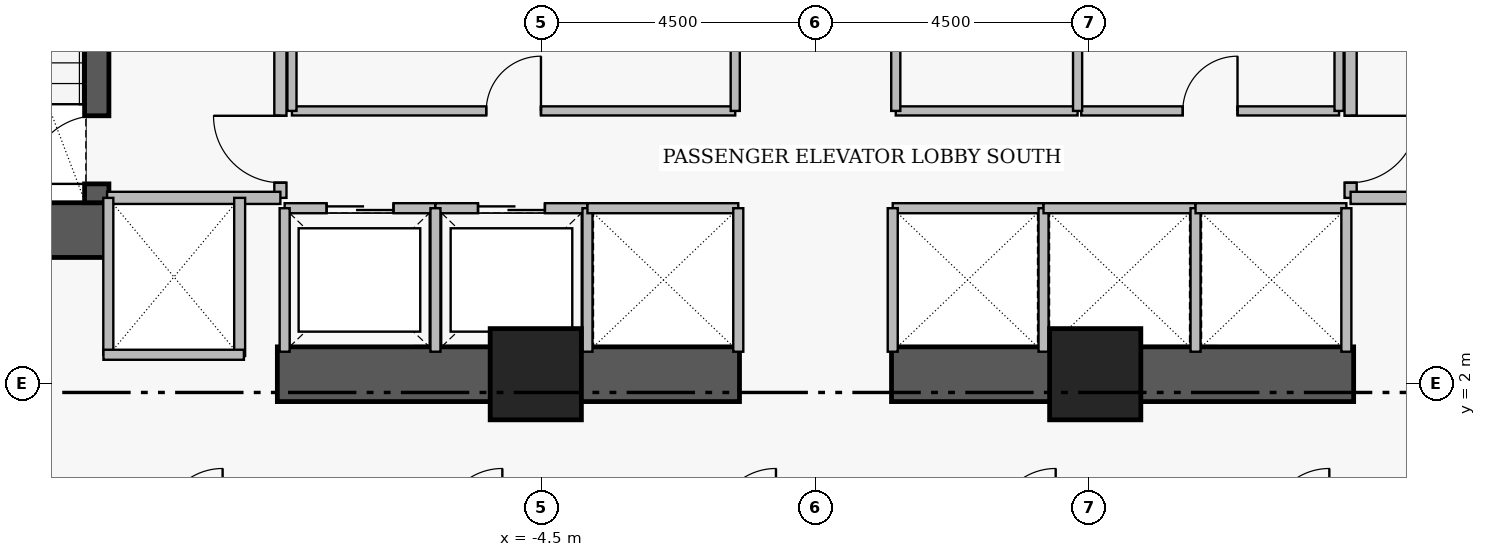
"""IFC4 building model, lengths in metres.
Left out: names, types, materials, properties, quantities, classifications, styles, units other than length and angle.
Written with IfcOpenShell. Run it as: python <this file> out.ifc"""

import sys

from ifc_helpers import new_model, si_unit, direction, frame, frame_2d, origin, origin_2d, place, context, subcontext, project, spatial, rectangle, extrude, element, fill, save


model = new_model("IFC4")
c1 = context("Model", 3, precision=1e-05, world=origin(), true_north=direction((0.0, 1.0)))
c2 = subcontext(c1, "Body", "Model", "MODEL_VIEW")
j1 = project(units=[si_unit("LENGTHUNIT", "METRE"), si_unit("PLANEANGLEUNIT", "RADIAN")], contexts=[c1])
p1 = place(None, origin())
s1 = spatial("IfcSite", under=j1, at=p1, CompositionType="ELEMENT")
p2 = place(p1, origin())
s2 = spatial("IfcBuilding", under=s1, at=p2, CompositionType="ELEMENT")
p3 = place(p2, frame((0.0, 0.0, 60.45)))
s3 = spatial("IfcBuildingStorey", under=s2, at=p3, CompositionType="ELEMENT", Elevation=60.45)
p4 = place(p3, frame((-16.31, 4.52, 0.0), z_axis=(0.0, 0.0, 1.0), x_axis=(1.0, 0.0, 0.0)))
e1 = element("IfcWall", 1, at=p4, inside=s3, PredefinedType="SHEAR", context=c2, shape_type="SweptSolid", body=[
    extrude(rectangle(XDim=4.71, YDim=0.9, at=frame_2d((2.355, 0.0))), origin(), (0.0, 0.0, 1.0), 3.46),
])
for number, where, z_axis, x_axis in (
    (2, (-8.85, 2.15, 0.0), (0.0, 0.0, 1.0), (1.0, 0.0, 0.0)),
    (3, (1.25, 2.15, 0.0), (0.0, 0.0, 1.0), (1.0, 0.0, 0.0)),
):
    element("IfcWall", number, at=place(p3, frame(where, z_axis=z_axis, x_axis=x_axis)), inside=s3, PredefinedType="SHEAR", context=c2, shape_type="SweptSolid", body=[
        extrude(rectangle(XDim=7.6, YDim=0.9, at=frame_2d((3.8, 0.0))), origin(), (0.0, 0.0, 1.0), 3.43),
    ])
p5 = place(p3, frame((-11.82, 4.97, 0.0), z_axis=(0.0, 0.0, 1.0), x_axis=(0.0, 1.0, 0.0)))
e4 = element("IfcWall", 4, at=p5, inside=s3, PredefinedType="SHEAR", context=c2, shape_type="SweptSolid", body=[
    extrude(rectangle(XDim=8.96, YDim=0.4, at=frame_2d((4.48, 0.0))), origin(), (0.0, 0.0, 1.0), 3.46),
])
p6 = place(p5, frame((0.31, 0.0, 0.0)))
e5 = element("IfcOpeningElement", 5, at=p6, cuts=e4, PredefinedType="OPENING", context=c2, shape_type="SweptSolid", body=[
    extrude(rectangle(XDim=1.12, YDim=2.22, at=frame_2d((0.56, 1.11))), frame((0.0, 0.21, 0.0), z_axis=(0.0, -1.0, 0.0), x_axis=(1.0, 0.0, 0.0)), (0.0, 0.0, 1.0), 0.42),
])
for number, where, z_axis, x_axis in (
    (6, (-4.6, 2.15, 0.0), (0.0, 0.0, 1.0), (1.0, 0.0, 0.0)),
    (7, (4.6, 2.15, 0.0), (0.0, 0.0, 1.0), (1.0, 0.0, 0.0)),
):
    element("IfcColumn", number, at=place(p3, frame(where, z_axis=z_axis, x_axis=x_axis)), inside=s3, PredefinedType="COLUMN", context=c2, shape_type="SweptSolid", body=[
        extrude(rectangle(XDim=1.5, YDim=1.5, at=origin_2d()), origin(), (0.0, 0.0, 1.0), 3.65),
    ])
p7 = place(p3, frame((-8.8, 5.05, 0.0), z_axis=(0.0, 0.0, 1.0), x_axis=(0.0, 1.0, 0.0)))
e8 = element("IfcWall", 8, at=p7, inside=s3, PredefinedType="PARTITIONING", context=c2, shape_type="SweptSolid", body=[
    extrude(rectangle(XDim=6.1, YDim=0.2, at=frame_2d((3.05, 0.0))), origin(), (0.0, 0.0, 1.0), 3.43),
])
p8 = place(p7, frame((0.25, 0.0, 0.0)))
e9 = element("IfcOpeningElement", 9, at=p8, cuts=e8, PredefinedType="OPENING", context=c2, shape_type="SweptSolid", body=[
    extrude(rectangle(XDim=1.1, YDim=2.2, at=frame_2d((0.55, 1.1))), frame((0.0, 0.11, 0.0), z_axis=(0.0, -1.0, 0.0), x_axis=(1.0, 0.0, 0.0)), (0.0, 0.0, 1.0), 0.22),
])
p9 = place(p7, frame((3.85, 0.0, 0.0)))
e10 = element("IfcOpeningElement", 10, at=p9, cuts=e8, PredefinedType="OPENING", context=c2, shape_type="SweptSolid", body=[
    extrude(rectangle(XDim=1.1, YDim=2.2, at=frame_2d((0.55, 1.1))), frame((0.0, 0.11, 0.0), z_axis=(0.0, -1.0, 0.0), x_axis=(1.0, 0.0, 0.0)), (0.0, 0.0, 1.0), 0.22),
])
p10 = place(p3, frame((8.8, 11.15, 0.0), z_axis=(0.0, 0.0, 1.0), x_axis=(0.0, -1.0, 0.0)))
e11 = element("IfcWall", 11, at=p10, inside=s3, PredefinedType="PARTITIONING", context=c2, shape_type="SweptSolid", body=[
    extrude(rectangle(XDim=6.1, YDim=0.2, at=frame_2d((3.05, 0.0))), origin(), (0.0, 0.0, 1.0), 3.43),
])
p11 = place(p10, frame((1.15, 0.0, 0.0)))
e12 = element("IfcOpeningElement", 12, at=p11, cuts=e11, PredefinedType="OPENING", context=c2, shape_type="SweptSolid", body=[
    extrude(rectangle(XDim=1.1, YDim=2.2, at=frame_2d((0.55, 1.1))), frame((0.0, 0.11, 0.0), z_axis=(0.0, -1.0, 0.0), x_axis=(1.0, 0.0, 0.0)), (0.0, 0.0, 1.0), 0.22),
])
p12 = place(p10, frame((4.75, 0.0, 0.0)))
e13 = element("IfcOpeningElement", 13, at=p12, cuts=e11, PredefinedType="OPENING", context=c2, shape_type="SweptSolid", body=[
    extrude(rectangle(XDim=1.1, YDim=2.2, at=frame_2d((0.55, 1.1))), frame((0.0, 0.11, 0.0), z_axis=(0.0, -1.0, 0.0), x_axis=(1.0, 0.0, 0.0)), (0.0, 0.0, 1.0), 0.22),
])
p13 = place(p3, frame((-8.73, 4.88, 0.0), z_axis=(0.0, 0.0, 1.0), x_axis=(1.0, 0.0, 0.0)))
e14 = element("IfcWall", 14, at=p13, inside=s3, PredefinedType="PARTITIONING", context=c2, shape_type="SweptSolid", body=[
    extrude(rectangle(XDim=2.48, YDim=0.165, at=frame_2d((1.24, 0.0))), origin(), (0.0, 0.0, 1.0), 3.43),
])
p14 = place(p13, frame((0.69, 0.0, 0.0)))
e15 = element("IfcOpeningElement", 15, at=p14, cuts=e14, PredefinedType="OPENING", context=c2, shape_type="SweptSolid", body=[
    extrude(rectangle(XDim=1.1, YDim=2.25, at=frame_2d((0.55, 1.125))), frame((0.0, 0.093, 0.0), z_axis=(0.0, -1.0, 0.0), x_axis=(1.0, 0.0, 0.0)), (0.0, 0.0, 1.0), 0.185),
])
p15 = place(p3, frame((-6.25, 4.88, 0.0), z_axis=(0.0, 0.0, 1.0), x_axis=(1.0, 0.0, 0.0)))
e16 = element("IfcWall", 16, at=p15, inside=s3, PredefinedType="PARTITIONING", context=c2, shape_type="SweptSolid", body=[
    extrude(rectangle(XDim=2.5, YDim=0.165, at=frame_2d((1.25, 0.0))), origin(), (0.0, 0.0, 1.0), 3.43),
])
p16 = place(p15, frame((0.7, 0.0, 0.0)))
e17 = element("IfcOpeningElement", 17, at=p16, cuts=e16, PredefinedType="OPENING", context=c2, shape_type="SweptSolid", body=[
    extrude(rectangle(XDim=1.1, YDim=2.25, at=frame_2d((0.55, 1.125))), frame((0.0, 0.093, 0.0), z_axis=(0.0, -1.0, 0.0), x_axis=(1.0, 0.0, 0.0)), (0.0, 0.0, 1.0), 0.185),
])
p17 = place(p3, frame((-8.61, 6.48, 0.0), z_axis=(0.0, 0.0, 1.0), x_axis=(1.0, 0.0, 0.0)))
e18 = element("IfcWall", 18, at=p17, inside=s3, PredefinedType="PARTITIONING", context=c2, shape_type="SweptSolid", body=[
    extrude(rectangle(XDim=7.29, YDim=0.15, at=frame_2d((3.645, 0.0))), origin(), (0.0, 0.0, 1.0), 3.43),
])
p18 = place(p17, frame((3.195, 0.0, 0.0)))
e19 = element("IfcOpeningElement", 19, at=p18, cuts=e18, PredefinedType="OPENING", context=c2, shape_type="SweptSolid", body=[
    extrude(rectangle(XDim=0.9, YDim=2.15, at=frame_2d((0.45, 1.075))), frame((0.0, 0.085, 0.0), z_axis=(0.0, -1.0, 0.0), x_axis=(1.0, 0.0, 0.0)), (0.0, 0.0, 1.0), 0.17),
])
p19 = place(p3, frame((4.37, 6.48, 0.0), z_axis=(0.0, 0.0, 1.0), x_axis=(1.0, 0.0, 0.0)))
e20 = element("IfcWall", 20, at=p19, inside=s3, PredefinedType="PARTITIONING", context=c2, shape_type="SweptSolid", body=[
    extrude(rectangle(XDim=4.24, YDim=0.15, at=frame_2d((2.12, 0.0))), origin(), (0.0, 0.0, 1.0), 3.43),
])
p20 = place(p19, frame((1.67, 0.0, 0.0)))
e21 = element("IfcOpeningElement", 21, at=p20, cuts=e20, PredefinedType="OPENING", context=c2, shape_type="SweptSolid", body=[
    extrude(rectangle(XDim=0.9, YDim=2.15, at=frame_2d((0.45, 1.075))), frame((0.0, 0.085, 0.0), z_axis=(0.0, -1.0, 0.0), x_axis=(1.0, 0.0, 0.0)), (0.0, 0.0, 1.0), 0.17),
])
for number, where, z_axis, x_axis in (
    (22, (-11.65, 5.05, 0.0), (0.0, 0.0, 1.0), (1.0, 0.0, 0.0)),
    (23, (8.8, 5.05, 0.0), (0.0, 0.0, 1.0), (1.0, 0.0, 0.0)),
):
    element("IfcWall", number, at=place(p3, frame(where, z_axis=z_axis, x_axis=x_axis)), inside=s3, PredefinedType="PARTITIONING", context=c2, shape_type="SweptSolid", body=[
        extrude(rectangle(XDim=2.85, YDim=0.2, at=frame_2d((1.425, 0.0))), origin(), (0.0, 0.0, 1.0), 3.43),
    ])
for number, where, z_axis, x_axis in (
    (24, (-8.73, 2.52, 0.0), (0.0, 0.0, 1.0), (0.0, 1.0, 0.0)),
    (25, (-6.25, 2.52, 0.0), (0.0, 0.0, 1.0), (0.0, 1.0, 0.0)),
    (26, (-3.75, 2.52, 0.0), (0.0, 0.0, 1.0), (0.0, 1.0, 0.0)),
):
    element("IfcWall", number, at=place(p3, frame(where, z_axis=z_axis, x_axis=x_axis)), inside=s3, PredefinedType="PARTITIONING", context=c2, shape_type="SweptSolid", body=[
        extrude(rectangle(XDim=2.36, YDim=0.165, at=frame_2d((1.18, 0.0))), origin(), (0.0, 0.0, 1.0), 3.43),
    ])
p21 = place(p3, frame((-3.75, 4.88, 0.0), z_axis=(0.0, 0.0, 1.0), x_axis=(1.0, 0.0, 0.0)))
e27 = element("IfcWall", 27, at=p21, inside=s3, PredefinedType="PARTITIONING", context=c2, shape_type="SweptSolid", body=[
    extrude(rectangle(XDim=2.48, YDim=0.165, at=frame_2d((1.24, 0.0))), origin(), (0.0, 0.0, 1.0), 3.43),
])
p22 = place(p3, frame((-1.27, 2.52, 0.0), z_axis=(0.0, 0.0, 1.0), x_axis=(0.0, 1.0, 0.0)))
e28 = element("IfcWall", 28, at=p22, inside=s3, PredefinedType="PARTITIONING", context=c2, shape_type="SweptSolid", body=[
    extrude(rectangle(XDim=2.36, YDim=0.165, at=frame_2d((1.18, 0.0))), origin(), (0.0, 0.0, 1.0), 3.43),
])
p23 = place(p3, frame((1.27, 4.88, 0.0), z_axis=(0.0, 0.0, 1.0), x_axis=(1.0, 0.0, 0.0)))
e29 = element("IfcWall", 29, at=p23, inside=s3, PredefinedType="PARTITIONING", context=c2, shape_type="SweptSolid", body=[
    extrude(rectangle(XDim=2.48, YDim=0.165, at=frame_2d((1.24, 0.0))), origin(), (0.0, 0.0, 1.0), 3.43),
])
for number, where, z_axis, x_axis in (
    (30, (1.27, 2.52, 0.0), (0.0, 0.0, 1.0), (0.0, 1.0, 0.0)),
    (31, (3.75, 2.52, 0.0), (0.0, 0.0, 1.0), (0.0, 1.0, 0.0)),
):
    element("IfcWall", number, at=place(p3, frame(where, z_axis=z_axis, x_axis=x_axis)), inside=s3, PredefinedType="PARTITIONING", context=c2, shape_type="SweptSolid", body=[
        extrude(rectangle(XDim=2.36, YDim=0.165, at=frame_2d((1.18, 0.0))), origin(), (0.0, 0.0, 1.0), 3.43),
    ])
p24 = place(p3, frame((3.75, 4.88, 0.0), z_axis=(0.0, 0.0, 1.0), x_axis=(1.0, 0.0, 0.0)))
e32 = element("IfcWall", 32, at=p24, inside=s3, PredefinedType="PARTITIONING", context=c2, shape_type="SweptSolid", body=[
    extrude(rectangle(XDim=2.5, YDim=0.165, at=frame_2d((1.25, 0.0))), origin(), (0.0, 0.0, 1.0), 3.43),
])
p25 = place(p3, frame((6.25, 2.52, 0.0), z_axis=(0.0, 0.0, 1.0), x_axis=(0.0, 1.0, 0.0)))
e33 = element("IfcWall", 33, at=p25, inside=s3, PredefinedType="PARTITIONING", context=c2, shape_type="SweptSolid", body=[
    extrude(rectangle(XDim=2.36, YDim=0.165, at=frame_2d((1.18, 0.0))), origin(), (0.0, 0.0, 1.0), 3.43),
])
p26 = place(p3, frame((6.25, 4.88, 0.0), z_axis=(0.0, 0.0, 1.0), x_axis=(1.0, 0.0, 0.0)))
e34 = element("IfcWall", 34, at=p26, inside=s3, PredefinedType="PARTITIONING", context=c2, shape_type="SweptSolid", body=[
    extrude(rectangle(XDim=2.48, YDim=0.165, at=frame_2d((1.24, 0.0))), origin(), (0.0, 0.0, 1.0), 3.43),
])
p27 = place(p3, frame((8.73, 2.52, 0.0), z_axis=(0.0, 0.0, 1.0), x_axis=(0.0, 1.0, 0.0)))
e35 = element("IfcWall", 35, at=p27, inside=s3, PredefinedType="PARTITIONING", context=c2, shape_type="SweptSolid", body=[
    extrude(rectangle(XDim=2.36, YDim=0.165, at=frame_2d((1.18, 0.0))), origin(), (0.0, 0.0, 1.0), 3.43),
])
p28 = place(p3, frame((-9.47, 2.45, 0.0), z_axis=(0.0, 0.0, 1.0), x_axis=(0.0, 1.0, 0.0)))
e36 = element("IfcWall", 36, at=p28, inside=s3, PredefinedType="PARTITIONING", context=c2, shape_type="SweptSolid", body=[
    extrude(rectangle(XDim=2.6, YDim=0.18, at=frame_2d((1.3, 0.0))), origin(), (0.0, 0.0, 1.0), 3.43),
])
p29 = place(p3, frame((-11.63, 2.47, 0.0), z_axis=(0.0, 0.0, 1.0), x_axis=(0.0, 1.0, 0.0)))
e37 = element("IfcWall", 37, at=p29, inside=s3, PredefinedType="PARTITIONING", context=c2, shape_type="SweptSolid", body=[
    extrude(rectangle(XDim=2.58, YDim=0.165, at=frame_2d((1.29, 0.0))), origin(), (0.0, 0.0, 1.0), 3.43),
])
p30 = place(p3, frame((-11.71, 2.47, 0.0), z_axis=(0.0, 0.0, 1.0), x_axis=(1.0, 0.0, 0.0)))
e38 = element("IfcWall", 38, at=p30, inside=s3, PredefinedType="PARTITIONING", context=c2, shape_type="SweptSolid", body=[
    extrude(rectangle(XDim=2.31, YDim=0.165, at=frame_2d((1.155, 0.0))), origin(), (0.0, 0.0, 1.0), 2.03),
])
for number, where, z_axis, x_axis in (
    (39, (-8.61, 6.48, 0.0), (0.0, 0.0, 1.0), (0.0, 1.0, 0.0)),
    (40, (-1.32, 6.48, 0.0), (0.0, 0.0, 1.0), (0.0, 1.0, 0.0)),
):
    element("IfcWall", number, at=place(p3, frame(where, z_axis=z_axis, x_axis=x_axis)), inside=s3, PredefinedType="PARTITIONING", context=c2, shape_type="SweptSolid", body=[
        extrude(rectangle(XDim=2.24, YDim=0.15, at=frame_2d((1.12, 0.0))), origin(), (0.0, 0.0, 1.0), 3.43),
    ])
p31 = place(p3, frame((1.32, 6.48, 0.0), z_axis=(0.0, 0.0, 1.0), x_axis=(1.0, 0.0, 0.0)))
e41 = element("IfcWall", 41, at=p31, inside=s3, PredefinedType="PARTITIONING", context=c2, shape_type="SweptSolid", body=[
    extrude(rectangle(XDim=2.99, YDim=0.15, at=frame_2d((1.495, 0.0))), origin(), (0.0, 0.0, 1.0), 3.43),
])
for number, where, z_axis, x_axis in (
    (42, (1.32, 6.48, 0.0), (0.0, 0.0, 1.0), (0.0, 1.0, 0.0)),
    (43, (4.31, 6.48, 0.0), (0.0, 0.0, 1.0), (0.0, 1.0, 0.0)),
    (44, (8.61, 6.48, 0.0), (0.0, 0.0, 1.0), (0.0, 1.0, 0.0)),
):
    element("IfcWall", number, at=place(p3, frame(where, z_axis=z_axis, x_axis=x_axis)), inside=s3, PredefinedType="PARTITIONING", context=c2, shape_type="SweptSolid", body=[
        extrude(rectangle(XDim=2.24, YDim=0.15, at=frame_2d((1.12, 0.0))), origin(), (0.0, 0.0, 1.0), 3.43),
    ])
p32 = place(p6, origin())
e45 = element("IfcDoor", 45, at=p32, inside=s3, OperationType="SINGLE_SWING_LEFT", PredefinedType="DOOR", context=c2, shape_type="SweptSolid", body=[
    extrude(rectangle(XDim=1.12, YDim=2.22, at=frame_2d((0.56, 1.11))), frame((0.0, 0.025, 0.0), z_axis=(0.0, -1.0, 0.0), x_axis=(1.0, 0.0, 0.0)), (0.0, 0.0, 1.0), 0.05),
])
fill(e5, e45)
p33 = place(p8, origin())
e46 = element("IfcDoor", 46, at=p33, inside=s3, OperationType="SINGLE_SWING_RIGHT", PredefinedType="DOOR", context=c2, shape_type="SweptSolid", body=[
    extrude(rectangle(XDim=1.1, YDim=2.2, at=frame_2d((0.55, 1.1))), frame((0.0, 0.025, 0.0), z_axis=(0.0, -1.0, 0.0), x_axis=(1.0, 0.0, 0.0)), (0.0, 0.0, 1.0), 0.05),
])
fill(e9, e46)
p34 = place(p12, origin())
e47 = element("IfcDoor", 47, at=p34, inside=s3, OperationType="SINGLE_SWING_LEFT", PredefinedType="DOOR", context=c2, shape_type="SweptSolid", body=[
    extrude(rectangle(XDim=1.1, YDim=2.2, at=frame_2d((0.55, 1.1))), frame((0.0, 0.025, 0.0), z_axis=(0.0, -1.0, 0.0), x_axis=(1.0, 0.0, 0.0)), (0.0, 0.0, 1.0), 0.05),
])
fill(e13, e47)
p35 = place(p14, origin())
e48 = element("IfcDoor", 48, at=p35, inside=s3, OperationType="SLIDING_TO_LEFT", PredefinedType="DOOR", context=c2, shape_type="SweptSolid", body=[
    extrude(rectangle(XDim=1.1, YDim=2.25, at=frame_2d((0.55, 1.125))), frame((0.0, 0.025, 0.0), z_axis=(0.0, -1.0, 0.0), x_axis=(1.0, 0.0, 0.0)), (0.0, 0.0, 1.0), 0.05),
])
fill(e15, e48)
p36 = place(p16, origin())
e49 = element("IfcDoor", 49, at=p36, inside=s3, OperationType="SLIDING_TO_LEFT", PredefinedType="DOOR", context=c2, shape_type="SweptSolid", body=[
    extrude(rectangle(XDim=1.1, YDim=2.25, at=frame_2d((0.55, 1.125))), frame((0.0, 0.025, 0.0), z_axis=(0.0, -1.0, 0.0), x_axis=(1.0, 0.0, 0.0)), (0.0, 0.0, 1.0), 0.05),
])
fill(e17, e49)
p37 = place(p18, origin())
e50 = element("IfcDoor", 50, at=p37, inside=s3, OperationType="SINGLE_SWING_RIGHT", PredefinedType="DOOR", context=c2, shape_type="SweptSolid", body=[
    extrude(rectangle(XDim=0.9, YDim=2.15, at=frame_2d((0.45, 1.075))), frame((0.0, 0.025, 0.0), z_axis=(0.0, -1.0, 0.0), x_axis=(1.0, 0.0, 0.0)), (0.0, 0.0, 1.0), 0.05),
])
fill(e19, e50)
p38 = place(p20, origin())
e51 = element("IfcDoor", 51, at=p38, inside=s3, OperationType="SINGLE_SWING_RIGHT", PredefinedType="DOOR", context=c2, shape_type="SweptSolid", body=[
    extrude(rectangle(XDim=0.9, YDim=2.15, at=frame_2d((0.45, 1.075))), frame((0.0, 0.025, 0.0), z_axis=(0.0, -1.0, 0.0), x_axis=(1.0, 0.0, 0.0)), (0.0, 0.0, 1.0), 0.05),
])
fill(e21, e51)
save(model, sys.argv[1])
